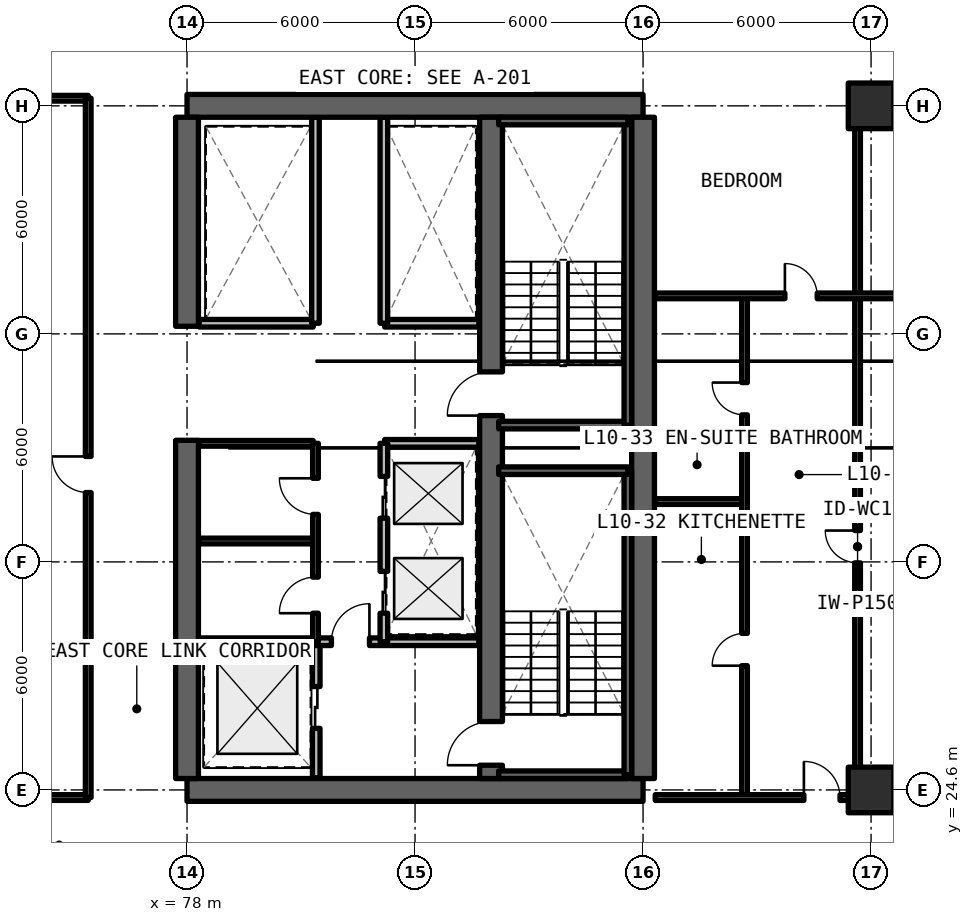
"""IFC4 building model, lengths in metres.
Left out: names, types, materials, properties, quantities, classifications, styles, units other than length and angle.
Written with IfcOpenShell. Run it as: python <this file> out.ifc"""

import sys

from ifc_helpers import new_model, si_unit, direction, frame, frame_2d, origin, origin_2d, place, context, subcontext, project, spatial, rectangle, extrude, element, fill, save


model = new_model("IFC4")
c1 = context("Model", 3, precision=1e-05, world=origin(), true_north=direction((0.0, 1.0)))
c2 = subcontext(c1, "Body", "Model", "MODEL_VIEW")
j1 = project(units=[si_unit("LENGTHUNIT", "METRE"), si_unit("PLANEANGLEUNIT", "RADIAN")], contexts=[c1])
p1 = place(None, origin())
s1 = spatial("IfcSite", under=j1, at=p1, CompositionType="ELEMENT")
p2 = place(p1, origin())
s2 = spatial("IfcBuilding", under=s1, at=p2, CompositionType="ELEMENT")
p3 = place(p2, frame((0.0, 0.0, 38.94)))
s3 = spatial("IfcBuildingStorey", under=s2, at=p3, CompositionType="ELEMENT", Elevation=38.94)
for number, where, z_axis, x_axis in (
    (1, (78.0, 24.6, 0.0), (0.0, 0.0, 1.0), (1.0, 0.0, 0.0)),
    (2, (90.0, 42.6, 0.0), (0.0, 0.0, 1.0), (-1.0, 0.0, 0.0)),
):
    element("IfcWall", number, at=place(p3, frame(where, z_axis=z_axis, x_axis=x_axis)), inside=s3, PredefinedType="SHEAR", context=c2, shape_type="SweptSolid", body=[
        extrude(rectangle(XDim=12.0, YDim=0.6, at=frame_2d((6.0, 0.0))), origin(), (0.0, 0.0, 1.0), 3.3),
    ])
p4 = place(p3, frame((90.0, 24.9, 0.0), z_axis=(0.0, 0.0, 1.0), x_axis=(0.0, 1.0, 0.0)))
e3 = element("IfcWall", 3, at=p4, inside=s3, PredefinedType="SHEAR", context=c2, shape_type="SweptSolid", body=[
    extrude(rectangle(XDim=17.4, YDim=0.6, at=frame_2d((8.7, 0.0))), origin(), (0.0, 0.0, 1.0), 3.3),
])
p5 = place(p3, frame((78.0, 24.9, 0.0), z_axis=(0.0, 0.0, 1.0), x_axis=(0.0, 1.0, 0.0)))
e4 = element("IfcWall", 4, at=p5, inside=s3, PredefinedType="SHEAR", context=c2, shape_type="SweptSolid", body=[
    extrude(rectangle(XDim=8.9, YDim=0.6, at=frame_2d((4.45, 0.0))), origin(), (0.0, 0.0, 1.0), 3.3),
])
p6 = place(p3, frame((78.0, 36.8, 0.0), z_axis=(0.0, 0.0, 1.0), x_axis=(0.0, 1.0, 0.0)))
e5 = element("IfcWall", 5, at=p6, inside=s3, PredefinedType="SHEAR", context=c2, shape_type="SweptSolid", body=[
    extrude(rectangle(XDim=5.5, YDim=0.6, at=frame_2d((2.75, 0.0))), origin(), (0.0, 0.0, 1.0), 3.3),
])
p7 = place(p3, frame((86.0, 24.9, 0.0), z_axis=(0.0, 0.0, 1.0), x_axis=(0.0, 1.0, 0.0)))
e6 = element("IfcWall", 6, at=p7, inside=s3, PredefinedType="SHEAR", context=c2, shape_type="SweptSolid", body=[
    extrude(rectangle(XDim=17.4, YDim=0.6, at=frame_2d((8.7, 0.0))), origin(), (0.0, 0.0, 1.0), 3.3),
])
p8 = place(p7, frame((0.35, 0.0, 0.0)))
e7 = element("IfcOpeningElement", 7, at=p8, cuts=e6, PredefinedType="OPENING", context=c2, shape_type="SweptSolid", body=[
    extrude(rectangle(XDim=1.15, YDim=2.15, at=frame_2d((0.575, 1.075))), frame((0.0, 0.31, 0.0), z_axis=(0.0, -1.0, 0.0), x_axis=(1.0, 0.0, 0.0)), (0.0, 0.0, 1.0), 0.62),
])
p9 = place(p7, frame((9.55, 0.0, 0.0)))
e8 = element("IfcOpeningElement", 8, at=p9, cuts=e6, PredefinedType="OPENING", context=c2, shape_type="SweptSolid", body=[
    extrude(rectangle(XDim=1.15, YDim=2.15, at=frame_2d((0.575, 1.075))), frame((0.0, 0.31, 0.0), z_axis=(0.0, -1.0, 0.0), x_axis=(1.0, 0.0, 0.0)), (0.0, 0.0, 1.0), 0.62),
])
for number, where, z_axis, x_axis in (
    (9, (96.0, 24.6, 0.0), (0.0, 0.0, 1.0), (1.0, 0.0, 0.0)),
    (10, (96.0, 42.6, 0.0), (0.0, 0.0, 1.0), (1.0, 0.0, 0.0)),
):
    element("IfcColumn", number, at=place(p3, frame(where, z_axis=z_axis, x_axis=x_axis)), inside=s3, PredefinedType="COLUMN", context=c2, shape_type="SweptSolid", body=[
        extrude(rectangle(XDim=1.2, YDim=1.2, at=origin_2d()), origin(), (0.0, 0.0, 1.0), 3.3),
    ])
p10 = place(p3, frame((81.4, 24.92, 0.0), z_axis=(0.0, 0.0, 1.0), x_axis=(0.0, 1.0, 0.0)))
e11 = element("IfcWall", 11, at=p10, inside=s3, PredefinedType="SOLIDWALL", context=c2, shape_type="SweptSolid", body=[
    extrude(rectangle(XDim=3.58, YDim=0.2, at=frame_2d((1.79, 0.0))), origin(), (0.0, 0.0, 1.0), 2.35),
])
p11 = place(p10, frame((1.3, 0.0, 0.0)))
e12 = element("IfcOpeningElement", 12, at=p11, cuts=e11, PredefinedType="OPENING", context=c2, shape_type="SweptSolid", body=[
    extrude(rectangle(XDim=1.1, YDim=2.2, at=frame_2d((0.55, 1.1))), frame((0.0, 0.11, 0.0), z_axis=(0.0, -1.0, 0.0), x_axis=(1.0, 0.0, 0.0)), (0.0, 0.0, 1.0), 0.22),
])
p12 = place(p3, frame((78.32, 28.5, 0.0), z_axis=(0.0, 0.0, 1.0), x_axis=(1.0, 0.0, 0.0)))
e13 = element("IfcWall", 13, at=p12, inside=s3, PredefinedType="SOLIDWALL", context=c2, shape_type="SweptSolid", body=[
    extrude(rectangle(XDim=7.36, YDim=0.2, at=frame_2d((3.68, 0.0))), origin(), (0.0, 0.0, 1.0), 2.35),
])
p13 = place(p12, frame((3.48, 0.0, 0.0)))
e14 = element("IfcOpeningElement", 14, at=p13, cuts=e13, PredefinedType="OPENING", context=c2, shape_type="SweptSolid", body=[
    extrude(rectangle(XDim=1.0, YDim=2.15, at=frame_2d((0.5, 1.075))), frame((0.0, 0.11, 0.0), z_axis=(0.0, -1.0, 0.0), x_axis=(1.0, 0.0, 0.0)), (0.0, 0.0, 1.0), 0.22),
])
p14 = place(p3, frame((83.2, 33.72, 0.0), z_axis=(0.0, 0.0, 1.0), x_axis=(1.0, 0.0, 0.0)))
e15 = element("IfcWall", 15, at=p14, inside=s3, PredefinedType="SOLIDWALL", context=c2, shape_type="SweptSolid", body=[
    extrude(rectangle(XDim=2.48, YDim=0.2, at=frame_2d((1.24, 0.0))), origin(), (0.0, 0.0, 1.0), 2.35),
])
p15 = place(p3, frame((83.18, 28.5, 0.0), z_axis=(0.0, 0.0, 1.0), x_axis=(0.0, 1.0, 0.0)))
e16 = element("IfcWall", 16, at=p15, inside=s3, PredefinedType="SOLIDWALL", context=c2, shape_type="SweptSolid", body=[
    extrude(rectangle(XDim=5.22, YDim=0.2, at=frame_2d((2.61, 0.0))), origin(), (0.0, 0.0, 1.0), 2.35),
])
p16 = place(p15, frame((0.75, 0.0, 0.0)))
e17 = element("IfcOpeningElement", 17, at=p16, cuts=e16, PredefinedType="OPENING", context=c2, shape_type="SweptSolid", body=[
    extrude(rectangle(XDim=1.1, YDim=2.2, at=frame_2d((0.55, 1.1))), frame((0.0, 0.11, 0.0), z_axis=(0.0, -1.0, 0.0), x_axis=(1.0, 0.0, 0.0)), (0.0, 0.0, 1.0), 0.22),
])
p17 = place(p15, frame((3.25, 0.0, 0.0)))
e18 = element("IfcOpeningElement", 18, at=p17, cuts=e16, PredefinedType="OPENING", context=c2, shape_type="SweptSolid", body=[
    extrude(rectangle(XDim=1.1, YDim=2.2, at=frame_2d((0.55, 1.1))), frame((0.0, 0.11, 0.0), z_axis=(0.0, -1.0, 0.0), x_axis=(1.0, 0.0, 0.0)), (0.0, 0.0, 1.0), 0.22),
])
for number, where, z_axis, x_axis in (
    (19, (78.32, 31.15, 0.0), (0.0, 0.0, 1.0), (1.0, 0.0, 0.0)),
    (20, (78.32, 33.72, 0.0), (0.0, 0.0, 1.0), (1.0, 0.0, 0.0)),
):
    element("IfcWall", number, at=place(p3, frame(where, z_axis=z_axis, x_axis=x_axis)), inside=s3, PredefinedType="SOLIDWALL", context=c2, shape_type="SweptSolid", body=[
        extrude(rectangle(XDim=3.0, YDim=0.15, at=frame_2d((1.5, 0.0))), origin(), (0.0, 0.0, 1.0), 2.35),
    ])
p18 = place(p3, frame((81.38, 28.5, 0.0), z_axis=(0.0, 0.0, 1.0), x_axis=(0.0, 1.0, 0.0)))
e21 = element("IfcWall", 21, at=p18, inside=s3, PredefinedType="SOLIDWALL", context=c2, shape_type="SweptSolid", body=[
    extrude(rectangle(XDim=5.22, YDim=0.15, at=frame_2d((2.61, 0.0))), origin(), (0.0, 0.0, 1.0), 2.35),
])
p19 = place(p18, frame((0.75, 0.0, 0.0)))
e22 = element("IfcOpeningElement", 22, at=p19, cuts=e21, PredefinedType="OPENING", context=c2, shape_type="SweptSolid", body=[
    extrude(rectangle(XDim=0.95, YDim=2.15, at=frame_2d((0.475, 1.075))), frame((0.0, 0.085, 0.0), z_axis=(0.0, -1.0, 0.0), x_axis=(1.0, 0.0, 0.0)), (0.0, 0.0, 1.0), 0.17),
])
p20 = place(p18, frame((3.35, 0.0, 0.0)))
e23 = element("IfcOpeningElement", 23, at=p20, cuts=e21, PredefinedType="OPENING", context=c2, shape_type="SweptSolid", body=[
    extrude(rectangle(XDim=0.95, YDim=2.15, at=frame_2d((0.475, 1.075))), frame((0.0, 0.085, 0.0), z_axis=(0.0, -1.0, 0.0), x_axis=(1.0, 0.0, 0.0)), (0.0, 0.0, 1.0), 0.17),
])
p21 = place(p3, frame((83.2, 36.88, 0.0), z_axis=(0.0, 0.0, 1.0), x_axis=(1.0, 0.0, 0.0)))
e24 = element("IfcWall", 24, at=p21, inside=s3, PredefinedType="SOLIDWALL", context=c2, shape_type="SweptSolid", body=[
    extrude(rectangle(XDim=2.48, YDim=0.2, at=frame_2d((1.24, 0.0))), origin(), (0.0, 0.0, 1.0), 2.35),
])
p22 = place(p3, frame((83.18, 36.88, 0.0), z_axis=(0.0, 0.0, 1.0), x_axis=(0.0, 1.0, 0.0)))
e25 = element("IfcWall", 25, at=p22, inside=s3, PredefinedType="SOLIDWALL", context=c2, shape_type="SweptSolid", body=[
    extrude(rectangle(XDim=5.42, YDim=0.2, at=frame_2d((2.71, 0.0))), origin(), (0.0, 0.0, 1.0), 2.35),
])
p23 = place(p3, frame((78.32, 36.88, 0.0), z_axis=(0.0, 0.0, 1.0), x_axis=(1.0, 0.0, 0.0)))
e26 = element("IfcWall", 26, at=p23, inside=s3, PredefinedType="SOLIDWALL", context=c2, shape_type="SweptSolid", body=[
    extrude(rectangle(XDim=3.0, YDim=0.2, at=frame_2d((1.5, 0.0))), origin(), (0.0, 0.0, 1.0), 2.35),
])
p24 = place(p3, frame((81.38, 36.88, 0.0), z_axis=(0.0, 0.0, 1.0), x_axis=(0.0, 1.0, 0.0)))
e27 = element("IfcWall", 27, at=p24, inside=s3, PredefinedType="SOLIDWALL", context=c2, shape_type="SweptSolid", body=[
    extrude(rectangle(XDim=5.42, YDim=0.2, at=frame_2d((2.71, 0.0))), origin(), (0.0, 0.0, 1.0), 2.35),
])
for number, where, z_axis, x_axis in (
    (28, (67.15, 24.4, 0.0), (0.0, 0.0, 1.0), (1.0, 0.0, 0.0)),
    (29, (67.15, 42.8, 0.0), (0.0, 0.0, 1.0), (1.0, 0.0, 0.0)),
):
    element("IfcWall", number, at=place(p3, frame(where, z_axis=z_axis, x_axis=x_axis)), inside=s3, PredefinedType="SOLIDWALL", context=c2, shape_type="SweptSolid", body=[
        extrude(rectangle(XDim=8.25, YDim=0.15, at=frame_2d((4.125, 0.0))), origin(), (0.0, 0.0, 1.0), 2.295),
    ])
p25 = place(p3, frame((75.4, 24.4, 0.0), z_axis=(0.0, 0.0, 1.0), x_axis=(0.0, 1.0, 0.0)))
e30 = element("IfcWall", 30, at=p25, inside=s3, PredefinedType="SOLIDWALL", context=c2, shape_type="SweptSolid", body=[
    extrude(rectangle(XDim=18.4, YDim=0.15, at=frame_2d((9.2, 0.0))), origin(), (0.0, 0.0, 1.0), 2.35),
])
p26 = place(p25, frame((8.025, 0.0, 0.0)))
e31 = element("IfcOpeningElement", 31, at=p26, cuts=e30, PredefinedType="OPENING", context=c2, shape_type="SweptSolid", body=[
    extrude(rectangle(XDim=0.95, YDim=2.15, at=frame_2d((0.475, 1.075))), frame((0.0, 0.085, 0.0), z_axis=(0.0, -1.0, 0.0), x_axis=(1.0, 0.0, 0.0)), (0.0, 0.0, 1.0), 0.17),
])
p27 = place(p3, frame((95.645, 24.4, 0.0), z_axis=(0.0, 0.0, 1.0), x_axis=(0.0, 1.0, 0.0)))
e32 = element("IfcWall", 32, at=p27, inside=s3, PredefinedType="PARTITIONING", context=c2, shape_type="SweptSolid", body=[
    extrude(rectangle(XDim=13.2, YDim=0.15, at=frame_2d((6.6, 0.0))), origin(), (0.0, 0.0, 1.0), 2.35),
])
p28 = place(p27, frame((6.175, 0.0, 0.0)))
e33 = element("IfcOpeningElement", 33, at=p28, cuts=e32, PredefinedType="OPENING", context=c2, shape_type="SweptSolid", body=[
    extrude(rectangle(XDim=0.85, YDim=2.1, at=frame_2d((0.425, 1.05))), frame((0.0, 0.085, 0.0), z_axis=(0.0, -1.0, 0.0), x_axis=(1.0, 0.0, 0.0)), (0.0, 0.0, 1.0), 0.17),
])
p29 = place(p3, frame((90.32, 32.188, 0.0), z_axis=(0.0, 0.0, 1.0), x_axis=(1.0, 0.0, 0.0)))
e34 = element("IfcWall", 34, at=p29, inside=s3, PredefinedType="PARTITIONING", context=c2, shape_type="SweptSolid", body=[
    extrude(rectangle(XDim=2.35, YDim=0.15, at=frame_2d((1.175, 0.0))), origin(), (0.0, 0.0, 1.0), 2.35),
])
p30 = place(p3, frame((92.67, 24.4, 0.0), z_axis=(0.0, 0.0, 1.0), x_axis=(0.0, 1.0, 0.0)))
e35 = element("IfcWall", 35, at=p30, inside=s3, PredefinedType="PARTITIONING", context=c2, shape_type="SweptSolid", body=[
    extrude(rectangle(XDim=13.2, YDim=0.15, at=frame_2d((6.6, 0.0))), origin(), (0.0, 0.0, 1.0), 2.35),
])
p31 = place(p30, frame((3.469, 0.0, 0.0)))
e36 = element("IfcOpeningElement", 36, at=p31, cuts=e35, PredefinedType="OPENING", context=c2, shape_type="SweptSolid", body=[
    extrude(rectangle(XDim=0.85, YDim=2.1, at=frame_2d((0.425, 1.05))), frame((0.0, 0.085, 0.0), z_axis=(0.0, -1.0, 0.0), x_axis=(1.0, 0.0, 0.0)), (0.0, 0.0, 1.0), 0.17),
])
p32 = place(p30, frame((10.069, 0.0, 0.0)))
e37 = element("IfcOpeningElement", 37, at=p32, cuts=e35, PredefinedType="OPENING", context=c2, shape_type="SweptSolid", body=[
    extrude(rectangle(XDim=0.85, YDim=2.1, at=frame_2d((0.425, 1.05))), frame((0.0, 0.085, 0.0), z_axis=(0.0, -1.0, 0.0), x_axis=(1.0, 0.0, 0.0)), (0.0, 0.0, 1.0), 0.17),
])
p33 = place(p3, frame((95.645, 37.6, 0.0), z_axis=(0.0, 0.0, 1.0), x_axis=(0.0, 1.0, 0.0)))
e38 = element("IfcWall", 38, at=p33, inside=s3, PredefinedType="PARTITIONING", context=c2, shape_type="SweptSolid", body=[
    extrude(rectangle(XDim=5.2, YDim=0.15, at=frame_2d((2.6, 0.0))), origin(), (0.0, 0.0, 1.0), 2.35),
])
p34 = place(p3, frame((90.32, 37.6, 0.0), z_axis=(0.0, 0.0, 1.0), x_axis=(1.0, 0.0, 0.0)))
e39 = element("IfcWall", 39, at=p34, inside=s3, PredefinedType="PARTITIONING", context=c2, shape_type="SweptSolid", body=[
    extrude(rectangle(XDim=10.24, YDim=0.15, at=frame_2d((5.12, 0.0))), origin(), (0.0, 0.0, 1.0), 2.35),
])
p35 = place(p34, frame((3.412, 0.0, 0.0)))
e40 = element("IfcOpeningElement", 40, at=p35, cuts=e39, PredefinedType="OPENING", context=c2, shape_type="SweptSolid", body=[
    extrude(rectangle(XDim=0.85, YDim=2.1, at=frame_2d((0.425, 1.05))), frame((0.0, 0.085, 0.0), z_axis=(0.0, -1.0, 0.0), x_axis=(1.0, 0.0, 0.0)), (0.0, 0.0, 1.0), 0.17),
])
p36 = place(p34, frame((7.357, 0.0, 0.0)))
e41 = element("IfcOpeningElement", 41, at=p36, cuts=e39, PredefinedType="OPENING", context=c2, shape_type="SweptSolid", body=[
    extrude(rectangle(XDim=0.85, YDim=2.1, at=frame_2d((0.425, 1.05))), frame((0.0, 0.085, 0.0), z_axis=(0.0, -1.0, 0.0), x_axis=(1.0, 0.0, 0.0)), (0.0, 0.0, 1.0), 0.17),
])
p37 = place(p3, frame((90.32, 24.4, 0.0), z_axis=(0.0, 0.0, 1.0), x_axis=(1.0, 0.0, 0.0)))
e42 = element("IfcWall", 42, at=p37, inside=s3, PredefinedType="SOLIDWALL", context=c2, shape_type="SweptSolid", body=[
    extrude(rectangle(XDim=10.24, YDim=0.15, at=frame_2d((5.12, 0.0))), origin(), (0.0, 0.0, 1.0), 2.295),
])
p38 = place(p37, frame((3.913, 0.0, 0.0)))
e43 = element("IfcOpeningElement", 43, at=p38, cuts=e42, PredefinedType="OPENING", context=c2, shape_type="SweptSolid", body=[
    extrude(rectangle(XDim=0.95, YDim=2.15, at=frame_2d((0.475, 1.075))), frame((0.0, 0.085, 0.0), z_axis=(0.0, -1.0, 0.0), x_axis=(1.0, 0.0, 0.0)), (0.0, 0.0, 1.0), 0.17),
])
p39 = place(p3, frame((86.2, 25.0, 0.0), z_axis=(0.0, 0.0, 1.0), x_axis=(1.0, 0.0, 0.0)))
e44 = element("IfcWall", 44, at=p39, inside=s3, PredefinedType="SOLIDWALL", context=c2, shape_type="SweptSolid", body=[
    extrude(rectangle(XDim=3.4, YDim=0.2, at=frame_2d((1.7, 0.0))), origin(), (0.0, 0.0, 1.0), 3.3),
])
p40 = place(p3, frame((89.6, 25.0, 0.0), z_axis=(0.0, 0.0, 1.0), x_axis=(0.0, 1.0, 0.0)))
e45 = element("IfcWall", 45, at=p40, inside=s3, PredefinedType="SOLIDWALL", context=c2, shape_type="SweptSolid", body=[
    extrude(rectangle(XDim=8.0, YDim=0.2, at=frame_2d((4.0, 0.0))), origin(), (0.0, 0.0, 1.0), 3.3),
])
for number, where, z_axis, x_axis in (
    (46, (89.6, 33.0, 0.0), (0.0, 0.0, 1.0), (-1.0, 0.0, 0.0)),
    (47, (86.2, 34.2, 0.0), (0.0, 0.0, 1.0), (1.0, 0.0, 0.0)),
):
    element("IfcWall", number, at=place(p3, frame(where, z_axis=z_axis, x_axis=x_axis)), inside=s3, PredefinedType="SOLIDWALL", context=c2, shape_type="SweptSolid", body=[
        extrude(rectangle(XDim=3.4, YDim=0.2, at=frame_2d((1.7, 0.0))), origin(), (0.0, 0.0, 1.0), 3.3),
    ])
p41 = place(p3, frame((89.6, 34.2, 0.0), z_axis=(0.0, 0.0, 1.0), x_axis=(0.0, 1.0, 0.0)))
e48 = element("IfcWall", 48, at=p41, inside=s3, PredefinedType="SOLIDWALL", context=c2, shape_type="SweptSolid", body=[
    extrude(rectangle(XDim=8.0, YDim=0.2, at=frame_2d((4.0, 0.0))), origin(), (0.0, 0.0, 1.0), 3.3),
])
p42 = place(p3, frame((89.6, 42.2, 0.0), z_axis=(0.0, 0.0, 1.0), x_axis=(-1.0, 0.0, 0.0)))
e49 = element("IfcWall", 49, at=p42, inside=s3, PredefinedType="SOLIDWALL", context=c2, shape_type="SweptSolid", body=[
    extrude(rectangle(XDim=3.4, YDim=0.2, at=frame_2d((1.7, 0.0))), origin(), (0.0, 0.0, 1.0), 3.3),
])
p43 = place(p11, origin())
e50 = element("IfcDoor", 50, at=p43, inside=s3, OperationType="SLIDING_TO_LEFT", PredefinedType="DOOR", context=c2, shape_type="SweptSolid", body=[
    extrude(rectangle(XDim=1.1, YDim=2.2, at=frame_2d((0.55, 1.1))), frame((0.0, 0.025, 0.0), z_axis=(0.0, -1.0, 0.0), x_axis=(1.0, 0.0, 0.0)), (0.0, 0.0, 1.0), 0.05),
])
fill(e12, e50)
p44 = place(p13, origin())
e51 = element("IfcDoor", 51, at=p44, inside=s3, OperationType="SINGLE_SWING_RIGHT", PredefinedType="DOOR", context=c2, shape_type="SweptSolid", body=[
    extrude(rectangle(XDim=1.0, YDim=2.15, at=frame_2d((0.5, 1.075))), frame((0.0, 0.025, 0.0), z_axis=(0.0, -1.0, 0.0), x_axis=(1.0, 0.0, 0.0)), (0.0, 0.0, 1.0), 0.05),
])
fill(e14, e51)
p45 = place(p16, origin())
e52 = element("IfcDoor", 52, at=p45, inside=s3, OperationType="SLIDING_TO_LEFT", PredefinedType="DOOR", context=c2, shape_type="SweptSolid", body=[
    extrude(rectangle(XDim=1.1, YDim=2.2, at=frame_2d((0.55, 1.1))), frame((0.0, 0.025, 0.0), z_axis=(0.0, -1.0, 0.0), x_axis=(1.0, 0.0, 0.0)), (0.0, 0.0, 1.0), 0.05),
])
fill(e17, e52)
p46 = place(p17, origin())
e53 = element("IfcDoor", 53, at=p46, inside=s3, OperationType="SLIDING_TO_RIGHT", PredefinedType="DOOR", context=c2, shape_type="SweptSolid", body=[
    extrude(rectangle(XDim=1.1, YDim=2.2, at=frame_2d((0.55, 1.1))), frame((0.0, 0.025, 0.0), z_axis=(0.0, -1.0, 0.0), x_axis=(1.0, 0.0, 0.0)), (0.0, 0.0, 1.0), 0.05),
])
fill(e18, e53)
p47 = place(p19, origin())
e54 = element("IfcDoor", 54, at=p47, inside=s3, OperationType="SINGLE_SWING_LEFT", PredefinedType="DOOR", context=c2, shape_type="SweptSolid", body=[
    extrude(rectangle(XDim=0.95, YDim=2.15, at=frame_2d((0.475, 1.075))), frame((0.0, 0.025, 0.0), z_axis=(0.0, -1.0, 0.0), x_axis=(1.0, 0.0, 0.0)), (0.0, 0.0, 1.0), 0.05),
])
fill(e22, e54)
p48 = place(p20, origin())
e55 = element("IfcDoor", 55, at=p48, inside=s3, OperationType="SINGLE_SWING_RIGHT", PredefinedType="DOOR", context=c2, shape_type="SweptSolid", body=[
    extrude(rectangle(XDim=0.95, YDim=2.15, at=frame_2d((0.475, 1.075))), frame((0.0, 0.025, 0.0), z_axis=(0.0, -1.0, 0.0), x_axis=(1.0, 0.0, 0.0)), (0.0, 0.0, 1.0), 0.05),
])
fill(e23, e55)
p49 = place(p26, origin())
e56 = element("IfcDoor", 56, at=p49, inside=s3, OperationType="SINGLE_SWING_RIGHT", PredefinedType="DOOR", context=c2, shape_type="SweptSolid", body=[
    extrude(rectangle(XDim=0.95, YDim=2.15, at=frame_2d((0.475, 1.075))), frame((0.0, 0.025, 0.0), z_axis=(0.0, -1.0, 0.0), x_axis=(1.0, 0.0, 0.0)), (0.0, 0.0, 1.0), 0.05),
])
fill(e31, e56)
p50 = place(p28, origin())
e57 = element("IfcDoor", 57, at=p50, inside=s3, OperationType="SINGLE_SWING_RIGHT", PredefinedType="DOOR", context=c2, shape_type="SweptSolid", body=[
    extrude(rectangle(XDim=0.85, YDim=2.1, at=frame_2d((0.425, 1.05))), frame((0.0, 0.025, 0.0), z_axis=(0.0, -1.0, 0.0), x_axis=(1.0, 0.0, 0.0)), (0.0, 0.0, 1.0), 0.05),
])
fill(e33, e57)
p51 = place(p31, origin())
e58 = element("IfcDoor", 58, at=p51, inside=s3, OperationType="SINGLE_SWING_LEFT", PredefinedType="DOOR", context=c2, shape_type="SweptSolid", body=[
    extrude(rectangle(XDim=0.85, YDim=2.1, at=frame_2d((0.425, 1.05))), frame((0.0, 0.025, 0.0), z_axis=(0.0, -1.0, 0.0), x_axis=(1.0, 0.0, 0.0)), (0.0, 0.0, 1.0), 0.05),
])
fill(e36, e58)
p52 = place(p32, origin())
e59 = element("IfcDoor", 59, at=p52, inside=s3, OperationType="SINGLE_SWING_RIGHT", PredefinedType="DOOR", context=c2, shape_type="SweptSolid", body=[
    extrude(rectangle(XDim=0.85, YDim=2.1, at=frame_2d((0.425, 1.05))), frame((0.0, 0.025, 0.0), z_axis=(0.0, -1.0, 0.0), x_axis=(1.0, 0.0, 0.0)), (0.0, 0.0, 1.0), 0.05),
])
fill(e37, e59)
p53 = place(p35, origin())
e60 = element("IfcDoor", 60, at=p53, inside=s3, OperationType="SINGLE_SWING_LEFT", PredefinedType="DOOR", context=c2, shape_type="SweptSolid", body=[
    extrude(rectangle(XDim=0.85, YDim=2.1, at=frame_2d((0.425, 1.05))), frame((0.0, 0.025, 0.0), z_axis=(0.0, -1.0, 0.0), x_axis=(1.0, 0.0, 0.0)), (0.0, 0.0, 1.0), 0.05),
])
fill(e40, e60)
p54 = place(p38, origin())
e61 = element("IfcDoor", 61, at=p54, inside=s3, OperationType="SINGLE_SWING_LEFT", PredefinedType="DOOR", context=c2, shape_type="SweptSolid", body=[
    extrude(rectangle(XDim=0.95, YDim=2.15, at=frame_2d((0.475, 1.075))), frame((0.0, 0.025, 0.0), z_axis=(0.0, -1.0, 0.0), x_axis=(1.0, 0.0, 0.0)), (0.0, 0.0, 1.0), 0.05),
])
fill(e43, e61)
p55 = place(p8, origin())
e62 = element("IfcDoor", 62, at=p55, inside=s3, OperationType="SINGLE_SWING_RIGHT", PredefinedType="DOOR", context=c2, shape_type="SweptSolid", body=[
    extrude(rectangle(XDim=1.15, YDim=2.15, at=frame_2d((0.575, 1.075))), frame((0.0, 0.025, 0.0), z_axis=(0.0, -1.0, 0.0), x_axis=(1.0, 0.0, 0.0)), (0.0, 0.0, 1.0), 0.05),
])
fill(e7, e62)
p56 = place(p9, origin())
e63 = element("IfcDoor", 63, at=p56, inside=s3, OperationType="SINGLE_SWING_LEFT", PredefinedType="DOOR", context=c2, shape_type="SweptSolid", body=[
    extrude(rectangle(XDim=1.15, YDim=2.15, at=frame_2d((0.575, 1.075))), frame((0.0, 0.025, 0.0), z_axis=(0.0, -1.0, 0.0), x_axis=(1.0, 0.0, 0.0)), (0.0, 0.0, 1.0), 0.05),
])
fill(e8, e63)
save(model, sys.argv[1])
